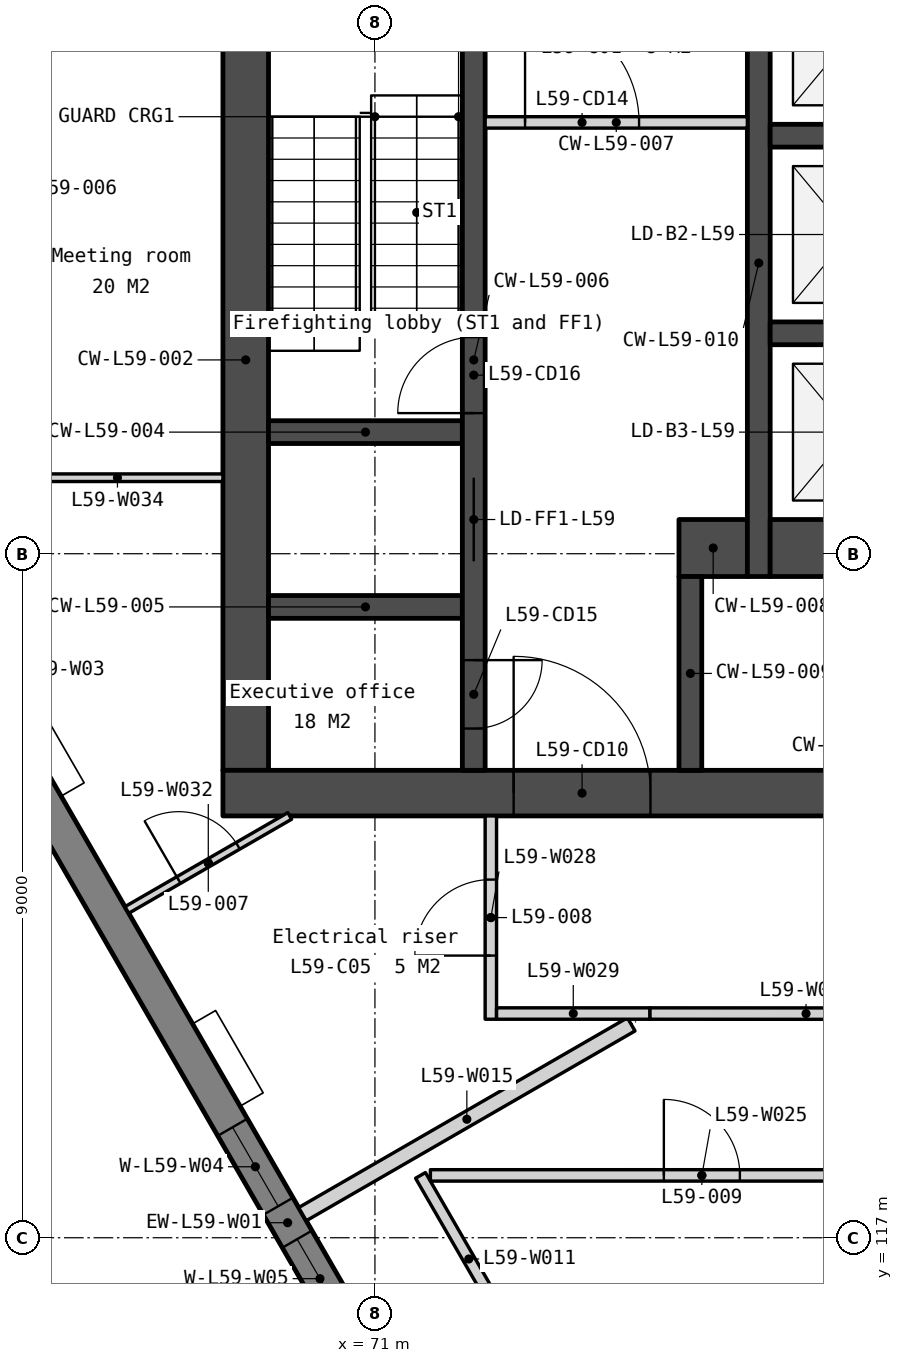
"""IFC4 building model, lengths in metres.
Left out: names, types, materials, properties, quantities, classifications, styles, units other than length and angle.
Written with IfcOpenShell. Run it as: python <this file> out.ifc"""

import sys

from ifc_helpers import new_model, si_unit, direction, frame, frame_2d, origin, place, context, subcontext, project, spatial, polyline, rectangle, outline, extrude, element, fill, save


model = new_model("IFC4")
c1 = context("Model", 3, precision=1e-05, world=origin(), true_north=direction((0.0, 1.0)))
c2 = subcontext(c1, "Body", "Model", "MODEL_VIEW")
j1 = project(units=[si_unit("LENGTHUNIT", "METRE"), si_unit("PLANEANGLEUNIT", "RADIAN")], contexts=[c1])
p1 = place(None, origin())
s1 = spatial("IfcSite", under=j1, at=p1, CompositionType="ELEMENT")
p2 = place(p1, origin())
s2 = spatial("IfcBuilding", under=s1, at=p2, CompositionType="ELEMENT")
p3 = place(p2, frame((0.0, 0.0, 242.6)))
s3 = spatial("IfcBuildingStorey", under=s2, at=p3, CompositionType="ELEMENT", Elevation=242.6)
p4 = place(p3, frame((69.3, 133.95, 0.0), z_axis=(0.0, 0.0, 1.0), x_axis=(0.0, -1.0, 0.0)))
e1 = element("IfcWall", 1, at=p4, inside=s3, PredefinedType="SOLIDWALL", context=c2, shape_type="SweptSolid", body=[
    extrude(rectangle(XDim=10.8, YDim=0.6, at=frame_2d((5.4, 0.0))), origin(), (0.0, 0.0, 1.0), 3.75),
])
p5 = place(p3, frame((69.0, 122.85, 0.0), z_axis=(0.0, 0.0, 1.0), x_axis=(1.0, 0.0, 0.0)))
e2 = element("IfcWall", 2, at=p5, inside=s3, PredefinedType="SOLIDWALL", context=c2, shape_type="SweptSolid", body=[
    extrude(rectangle(XDim=22.0, YDim=0.6, at=frame_2d((11.0, 0.0))), origin(), (0.0, 0.0, 1.0), 3.75),
])
p6 = place(p5, frame((16.375, 0.0, 0.0)))
e3 = element("IfcOpeningElement", 3, at=p6, cuts=e2, PredefinedType="OPENING", context=c2, shape_type="SweptSolid", body=[
    extrude(rectangle(XDim=1.8, YDim=2.1, at=frame_2d((0.9, 1.05))), frame((0.0, 0.31, 0.0), z_axis=(0.0, -1.0, 0.0), x_axis=(1.0, 0.0, 0.0)), (0.0, 0.0, 1.0), 0.62),
])
p7 = place(p5, frame((3.825, 0.0, 0.0)))
e4 = element("IfcOpeningElement", 4, at=p7, cuts=e2, PredefinedType="OPENING", context=c2, shape_type="SweptSolid", body=[
    extrude(rectangle(XDim=1.8, YDim=2.1, at=frame_2d((0.9, 1.05))), frame((0.0, 0.31, 0.0), z_axis=(0.0, -1.0, 0.0), x_axis=(1.0, 0.0, 0.0)), (0.0, 0.0, 1.0), 0.62),
])
p8 = place(p5, frame((12.85, 0.0, 0.0)))
e5 = element("IfcOpeningElement", 5, at=p8, cuts=e2, PredefinedType="OPENING", context=c2, shape_type="SweptSolid", body=[
    extrude(rectangle(XDim=1.5, YDim=2.1, at=frame_2d((0.75, 1.05))), frame((0.0, 0.31, 0.0), z_axis=(0.0, -1.0, 0.0), x_axis=(1.0, 0.0, 0.0)), (0.0, 0.0, 1.0), 0.62),
])
for number, where, z_axis, x_axis in (
    (6, (69.6, 127.6, 0.0), (0.0, 0.0, 1.0), (1.0, 0.0, 0.0)),
    (7, (69.6, 125.3, 0.0), (0.0, 0.0, 1.0), (1.0, 0.0, 0.0)),
):
    element("IfcWall", number, at=place(p3, frame(where, z_axis=z_axis, x_axis=x_axis)), inside=s3, PredefinedType="SOLIDWALL", context=c2, shape_type="SweptSolid", body=[
        extrude(rectangle(XDim=2.55, YDim=0.3, at=frame_2d((1.275, 0.0))), origin(), (0.0, 0.0, 1.0), 3.75),
    ])
p9 = place(p3, frame((72.3, 133.95, 0.0), z_axis=(0.0, 0.0, 1.0), x_axis=(0.0, -1.0, 0.0)))
e8 = element("IfcWall", 8, at=p9, inside=s3, PredefinedType="SOLIDWALL", context=c2, shape_type="SweptSolid", body=[
    extrude(rectangle(XDim=10.8, YDim=0.3, at=frame_2d((5.4, 0.0))), origin(), (0.0, 0.0, 1.0), 3.75),
])
p10 = place(p9, frame((6.95, 0.0, 0.0)))
e9 = element("IfcOpeningElement", 9, at=p10, cuts=e8, PredefinedType="OPENING", context=c2, shape_type="SweptSolid", body=[
    extrude(rectangle(XDim=1.1, YDim=2.1, at=frame_2d((0.55, 1.05))), frame((0.0, 0.16, 0.0), z_axis=(0.0, -1.0, 0.0), x_axis=(1.0, 0.0, 0.0)), (0.0, 0.0, 1.0), 0.32),
])
p11 = place(p9, frame((9.35, 0.0, 0.0)))
e10 = element("IfcOpeningElement", 10, at=p11, cuts=e8, PredefinedType="OPENING", context=c2, shape_type="SweptSolid", body=[
    extrude(rectangle(XDim=0.9, YDim=2.1, at=frame_2d((0.45, 1.05))), frame((0.0, 0.16, 0.0), z_axis=(0.0, -1.0, 0.0), x_axis=(1.0, 0.0, 0.0)), (0.0, 0.0, 1.0), 0.32),
])
p12 = place(p9, frame((5.1, 0.0, 0.0)))
e11 = element("IfcOpeningElement", 11, at=p12, cuts=e8, PredefinedType="OPENING", context=c2, shape_type="SweptSolid", body=[
    extrude(rectangle(XDim=1.0, YDim=2.1, at=frame_2d((0.5, 1.05))), frame((0.0, 0.16, 0.0), z_axis=(0.0, -1.0, 0.0), x_axis=(1.0, 0.0, 0.0)), (0.0, 0.0, 1.0), 0.32),
])
p13 = place(p3, frame((72.45, 131.675, 0.0), z_axis=(0.0, 0.0, 1.0), x_axis=(1.0, 0.0, 0.0)))
e12 = element("IfcWall", 12, at=p13, inside=s3, PredefinedType="PARTITIONING", context=c2, shape_type="SweptSolid", body=[
    extrude(rectangle(XDim=3.45, YDim=0.15, at=frame_2d((1.725, 0.0))), origin(), (0.0, 0.0, 1.0), 3.75),
])
p14 = place(p13, frame((0.525, 0.0, 0.0)))
e13 = element("IfcOpeningElement", 13, at=p14, cuts=e12, PredefinedType="OPENING", context=c2, shape_type="SweptSolid", body=[
    extrude(rectangle(XDim=1.5, YDim=2.1, at=frame_2d((0.75, 1.05))), frame((0.0, 0.085, 0.0), z_axis=(0.0, -1.0, 0.0), x_axis=(1.0, 0.0, 0.0)), (0.0, 0.0, 1.0), 0.17),
])
p15 = place(p3, frame((75.0, 126.075, 0.0), z_axis=(0.0, 0.0, 1.0), x_axis=(1.0, 0.0, 0.0)))
e14 = element("IfcWall", 14, at=p15, inside=s3, PredefinedType="SOLIDWALL", context=c2, shape_type="SweptSolid", body=[
    extrude(rectangle(XDim=0.9, YDim=0.75, at=frame_2d((0.45, 0.0))), origin(), (0.0, 0.0, 1.0), 3.75),
])
p16 = place(p3, frame((75.15, 125.7, 0.0), z_axis=(0.0, 0.0, 1.0), x_axis=(0.0, -1.0, 0.0)))
e15 = element("IfcWall", 15, at=p16, inside=s3, PredefinedType="SOLIDWALL", context=c2, shape_type="SweptSolid", body=[
    extrude(rectangle(XDim=2.55, YDim=0.3, at=frame_2d((1.275, 0.0))), origin(), (0.0, 0.0, 1.0), 3.75),
])
p17 = place(p3, frame((76.05, 133.95, 0.0), z_axis=(0.0, 0.0, 1.0), x_axis=(0.0, -1.0, 0.0)))
e16 = element("IfcWall", 16, at=p17, inside=s3, PredefinedType="SOLIDWALL", context=c2, shape_type="SweptSolid", body=[
    extrude(rectangle(XDim=8.25, YDim=0.3, at=frame_2d((4.125, 0.0))), origin(), (0.0, 0.0, 1.0), 3.75),
])
for number, where, z_axis, x_axis in (
    (17, (76.2, 131.5, 0.0), (0.0, 0.0, 1.0), (1.0, 0.0, 0.0)),
    (18, (76.2, 128.9, 0.0), (0.0, 0.0, 1.0), (1.0, 0.0, 0.0)),
):
    element("IfcWall", number, at=place(p3, frame(where, z_axis=z_axis, x_axis=x_axis)), inside=s3, PredefinedType="SOLIDWALL", context=c2, shape_type="SweptSolid", body=[
        extrude(rectangle(XDim=2.1, YDim=0.3, at=frame_2d((1.05, 0.0))), origin(), (0.0, 0.0, 1.0), 3.75),
    ])
p18 = place(p3, frame((76.2, 126.075, 0.0), z_axis=(0.0, 0.0, 1.0), x_axis=(1.0, 0.0, 0.0)))
e19 = element("IfcWall", 19, at=p18, inside=s3, PredefinedType="SOLIDWALL", context=c2, shape_type="SweptSolid", body=[
    extrude(rectangle(XDim=2.1, YDim=0.75, at=frame_2d((1.05, 0.0))), origin(), (0.0, 0.0, 1.0), 3.75),
])
p19 = place(p3, frame((60.609, 133.207, -0.15), z_axis=(0.0, 0.0, 1.0), x_axis=(0.500002536638, -0.866023939251, 0.0)))
e20 = element("IfcWall", 20, at=p19, inside=s3, PredefinedType="SOLIDWALL", context=c2, shape_type="SweptSolid", body=[
    extrude(outline(polyline([(36.972, 0.0), (36.972, 3.9), (0.0, 3.9), (0.0, 0.0), (36.972, 0.0)])), frame((0.0, 0.225, 0.0), z_axis=(0.0, -1.0, 0.0), x_axis=(1.0, 0.0, 0.0)), (0.0, 0.0, 1.0), 0.45),
])
p20 = place(p19, frame((0.715, 0.0, 0.95)))
e21 = element("IfcOpeningElement", 21, at=p20, cuts=e20, PredefinedType="OPENING", context=c2, shape_type="SweptSolid", body=[
    extrude(rectangle(XDim=1.2, YDim=2.2, at=frame_2d((0.6, 1.1))), frame((0.0, 0.235, 0.0), z_axis=(0.0, -1.0, 0.0), x_axis=(1.0, 0.0, 0.0)), (0.0, 0.0, 1.0), 0.47),
])
p21 = place(p19, frame((7.793, 0.0, 0.95)))
e22 = element("IfcOpeningElement", 22, at=p21, cuts=e20, PredefinedType="OPENING", context=c2, shape_type="SweptSolid", body=[
    extrude(rectangle(XDim=1.2, YDim=2.2, at=frame_2d((0.6, 1.1))), frame((0.0, 0.235, 0.0), z_axis=(0.0, -1.0, 0.0), x_axis=(1.0, 0.0, 0.0)), (0.0, 0.0, 1.0), 0.47),
])
p22 = place(p19, frame((9.493, 0.0, 0.95)))
e23 = element("IfcOpeningElement", 23, at=p22, cuts=e20, PredefinedType="OPENING", context=c2, shape_type="SweptSolid", body=[
    extrude(rectangle(XDim=1.2, YDim=2.2, at=frame_2d((0.6, 1.1))), frame((0.0, 0.235, 0.0), z_axis=(0.0, -1.0, 0.0), x_axis=(1.0, 0.0, 0.0)), (0.0, 0.0, 1.0), 0.47),
])
p23 = place(p19, frame((17.036, 0.0, 0.95)))
e24 = element("IfcOpeningElement", 24, at=p23, cuts=e20, PredefinedType="OPENING", context=c2, shape_type="SweptSolid", body=[
    extrude(rectangle(XDim=1.2, YDim=2.2, at=frame_2d((0.6, 1.1))), frame((0.0, 0.235, 0.0), z_axis=(0.0, -1.0, 0.0), x_axis=(1.0, 0.0, 0.0)), (0.0, 0.0, 1.0), 0.47),
])
p24 = place(p19, frame((18.736, 0.0, 0.95)))
e25 = element("IfcOpeningElement", 25, at=p24, cuts=e20, PredefinedType="OPENING", context=c2, shape_type="SweptSolid", body=[
    extrude(rectangle(XDim=1.2, YDim=2.2, at=frame_2d((0.6, 1.1))), frame((0.0, 0.235, 0.0), z_axis=(0.0, -1.0, 0.0), x_axis=(1.0, 0.0, 0.0)), (0.0, 0.0, 1.0), 0.47),
])
p25 = place(p19, frame((26.279, 0.0, 0.95)))
e26 = element("IfcOpeningElement", 26, at=p25, cuts=e20, PredefinedType="OPENING", context=c2, shape_type="SweptSolid", body=[
    extrude(rectangle(XDim=1.2, YDim=2.2, at=frame_2d((0.6, 1.1))), frame((0.0, 0.235, 0.0), z_axis=(0.0, -1.0, 0.0), x_axis=(1.0, 0.0, 0.0)), (0.0, 0.0, 1.0), 0.47),
])
p26 = place(p19, frame((27.979, 0.0, 0.95)))
e27 = element("IfcOpeningElement", 27, at=p26, cuts=e20, PredefinedType="OPENING", context=c2, shape_type="SweptSolid", body=[
    extrude(rectangle(XDim=1.2, YDim=2.2, at=frame_2d((0.6, 1.1))), frame((0.0, 0.235, 0.0), z_axis=(0.0, -1.0, 0.0), x_axis=(1.0, 0.0, 0.0)), (0.0, 0.0, 1.0), 0.47),
])
p27 = place(p19, frame((35.058, 0.0, 0.95)))
e28 = element("IfcOpeningElement", 28, at=p27, cuts=e20, PredefinedType="OPENING", context=c2, shape_type="SweptSolid", body=[
    extrude(rectangle(XDim=1.2, YDim=2.2, at=frame_2d((0.6, 1.1))), frame((0.0, 0.235, 0.0), z_axis=(0.0, -1.0, 0.0), x_axis=(1.0, 0.0, 0.0)), (0.0, 0.0, 1.0), 0.47),
])
p28 = place(p3, frame((71.6, 117.82, 0.0), z_axis=(0.0, 0.0, 1.0), x_axis=(0.500035802948, -0.866004731956, 0.0)))
e29 = element("IfcWall", 29, at=p28, inside=s3, PredefinedType="PARTITIONING", context=c2, shape_type="SweptSolid", body=[
    extrude(rectangle(XDim=2.54, YDim=0.15, at=frame_2d((1.27, 0.0))), origin(), (0.0, 0.0, 1.0), 3.75),
])
p29 = place(p3, frame((70.047, 117.31, 0.0), z_axis=(0.0, 0.0, 1.0), x_axis=(0.866032544947, 0.499987630939, 0.0)))
e30 = element("IfcWall", 30, at=p29, inside=s3, PredefinedType="PARTITIONING", context=c2, shape_type="SweptSolid", body=[
    extrude(rectangle(XDim=4.994, YDim=0.2, at=frame_2d((2.497, 0.0))), origin(), (0.0, 0.0, 1.0), 3.75),
])
p30 = place(p3, frame((71.729, 117.82, 0.0), z_axis=(0.0, 0.0, 1.0), x_axis=(1.0, 0.0, 0.0)))
e31 = element("IfcWall", 31, at=p30, inside=s3, PredefinedType="PARTITIONING", context=c2, shape_type="SweptSolid", body=[
    extrude(rectangle(XDim=7.144, YDim=0.15, at=frame_2d((3.572, 0.0))), origin(), (0.0, 0.0, 1.0), 3.75),
])
p31 = place(p30, frame((3.072, 0.0, 0.0)))
e32 = element("IfcOpeningElement", 32, at=p31, cuts=e31, PredefinedType="OPENING", context=c2, shape_type="SweptSolid", body=[
    extrude(rectangle(XDim=1.0, YDim=2.1, at=frame_2d((0.5, 1.05))), frame((0.0, 0.085, 0.0), z_axis=(0.0, -1.0, 0.0), x_axis=(1.0, 0.0, 0.0)), (0.0, 0.0, 1.0), 0.17),
])
p32 = place(p3, frame((72.525, 119.875, 0.0), z_axis=(0.0, 0.0, 1.0), x_axis=(0.0, 1.0, 0.0)))
e33 = element("IfcWall", 33, at=p32, inside=s3, PredefinedType="PARTITIONING", context=c2, shape_type="SweptSolid", body=[
    extrude(rectangle(XDim=2.675, YDim=0.15, at=frame_2d((1.337, 0.0))), origin(), (0.0, 0.0, 1.0), 3.75),
])
p33 = place(p32, frame((0.837, 0.0, 0.0)))
e34 = element("IfcOpeningElement", 34, at=p33, cuts=e33, PredefinedType="OPENING", context=c2, shape_type="SweptSolid", body=[
    extrude(rectangle(XDim=1.0, YDim=2.1, at=frame_2d((0.5, 1.05))), frame((0.0, 0.085, 0.0), z_axis=(0.0, -1.0, 0.0), x_axis=(1.0, 0.0, 0.0)), (0.0, 0.0, 1.0), 0.17),
])
p34 = place(p3, frame((72.6, 119.95, 0.0), z_axis=(0.0, 0.0, 1.0), x_axis=(1.0, 0.0, 0.0)))
e35 = element("IfcWall", 35, at=p34, inside=s3, PredefinedType="PARTITIONING", context=c2, shape_type="SweptSolid", body=[
    extrude(rectangle(XDim=2.019, YDim=0.15, at=frame_2d((1.009, 0.0))), origin(), (0.0, 0.0, 1.0), 3.75),
])
p35 = place(p3, frame((74.619, 119.95, 0.0), z_axis=(0.0, 0.0, 1.0), x_axis=(0.999999886891, -0.000475624203, 0.0)))
e36 = element("IfcWall", 36, at=p35, inside=s3, PredefinedType="PARTITIONING", context=c2, shape_type="SweptSolid", body=[
    extrude(rectangle(XDim=4.106, YDim=0.15, at=frame_2d((2.053, 0.0))), origin(), (0.0, 0.0, 1.0), 3.75),
])
p36 = place(p3, frame((67.736, 121.313, 0.0), z_axis=(0.0, 0.0, 1.0), x_axis=(0.866024577697, 0.500001430823, 0.0)))
e37 = element("IfcWall", 37, at=p36, inside=s3, PredefinedType="PARTITIONING", context=c2, shape_type="SweptSolid", body=[
    extrude(rectangle(XDim=2.475, YDim=0.1, at=frame_2d((1.237, 0.0))), origin(), (0.0, 0.0, 1.0), 3.75),
])
p37 = place(p36, frame((0.787, 0.0, 0.0)))
e38 = element("IfcOpeningElement", 38, at=p37, cuts=e37, PredefinedType="OPENING", context=c2, shape_type="SweptSolid", body=[
    extrude(rectangle(XDim=0.9, YDim=2.1, at=frame_2d((0.45, 1.05))), frame((0.0, 0.06, 0.0), z_axis=(0.0, -1.0, 0.0), x_axis=(1.0, 0.0, 0.0)), (0.0, 0.0, 1.0), 0.12),
])
p38 = place(p3, frame((66.224, 127.0, 0.0), z_axis=(0.0, 0.0, 1.0), x_axis=(1.0, 0.0, 0.0)))
e39 = element("IfcWall", 39, at=p38, inside=s3, PredefinedType="PARTITIONING", context=c2, shape_type="SweptSolid", body=[
    extrude(rectangle(XDim=2.776, YDim=0.1, at=frame_2d((1.388, 0.0))), origin(), (0.0, 0.0, 1.0), 3.75),
])
p39 = place(p10, origin())
e40 = element("IfcDoor", 40, at=p39, inside=s3, OperationType="SLIDING_TO_LEFT", PredefinedType="DOOR", context=c2, shape_type="SweptSolid", body=[
    extrude(rectangle(XDim=1.1, YDim=2.1, at=frame_2d((0.55, 1.05))), frame((0.0, 0.025, 0.0), z_axis=(0.0, -1.0, 0.0), x_axis=(1.0, 0.0, 0.0)), (0.0, 0.0, 1.0), 0.05),
])
fill(e9, e40)
p40 = place(p7, origin())
e41 = element("IfcDoor", 41, at=p40, inside=s3, OperationType="DOUBLE_DOOR_DOUBLE_SWING", PredefinedType="DOOR", context=c2, shape_type="SweptSolid", body=[
    extrude(rectangle(XDim=1.8, YDim=2.1, at=frame_2d((0.9, 1.05))), frame((0.0, 0.025, 0.0), z_axis=(0.0, -1.0, 0.0), x_axis=(1.0, 0.0, 0.0)), (0.0, 0.0, 1.0), 0.05),
])
fill(e4, e41)
p41 = place(p14, origin())
e42 = element("IfcDoor", 42, at=p41, inside=s3, OperationType="DOUBLE_DOOR_DOUBLE_SWING", PredefinedType="DOOR", context=c2, shape_type="SweptSolid", body=[
    extrude(rectangle(XDim=1.5, YDim=2.1, at=frame_2d((0.75, 1.05))), frame((0.0, 0.025, 0.0), z_axis=(0.0, -1.0, 0.0), x_axis=(1.0, 0.0, 0.0)), (0.0, 0.0, 1.0), 0.05),
])
fill(e13, e42)
p42 = place(p11, origin())
e43 = element("IfcDoor", 43, at=p42, inside=s3, OperationType="SINGLE_SWING_LEFT", PredefinedType="DOOR", context=c2, shape_type="SweptSolid", body=[
    extrude(rectangle(XDim=0.9, YDim=2.1, at=frame_2d((0.45, 1.05))), frame((0.0, 0.025, 0.0), z_axis=(0.0, -1.0, 0.0), x_axis=(1.0, 0.0, 0.0)), (0.0, 0.0, 1.0), 0.05),
])
fill(e10, e43)
p43 = place(p12, origin())
e44 = element("IfcDoor", 44, at=p43, inside=s3, OperationType="SINGLE_SWING_RIGHT", PredefinedType="DOOR", context=c2, shape_type="SweptSolid", body=[
    extrude(rectangle(XDim=1.0, YDim=2.1, at=frame_2d((0.5, 1.05))), frame((0.0, 0.025, 0.0), z_axis=(0.0, -1.0, 0.0), x_axis=(1.0, 0.0, 0.0)), (0.0, 0.0, 1.0), 0.05),
])
fill(e11, e44)
p44 = place(p23, origin())
e45 = element("IfcWindow", 45, at=p44, inside=s3, PartitioningType="SINGLE_PANEL", PredefinedType="WINDOW", context=c2, shape_type="SweptSolid", body=[
    extrude(rectangle(XDim=1.2, YDim=2.2, at=frame_2d((0.6, 1.1))), frame((0.0, 0.03, 0.0), z_axis=(0.0, -1.0, 0.0), x_axis=(1.0, 0.0, 0.0)), (0.0, 0.0, 1.0), 0.06),
])
fill(e24, e45)
p45 = place(p24, origin())
e46 = element("IfcWindow", 46, at=p45, inside=s3, PartitioningType="SINGLE_PANEL", PredefinedType="WINDOW", context=c2, shape_type="SweptSolid", body=[
    extrude(rectangle(XDim=1.2, YDim=2.2, at=frame_2d((0.6, 1.1))), frame((0.0, 0.03, 0.0), z_axis=(0.0, -1.0, 0.0), x_axis=(1.0, 0.0, 0.0)), (0.0, 0.0, 1.0), 0.06),
])
fill(e25, e46)
p46 = place(p37, origin())
e47 = element("IfcDoor", 47, at=p46, inside=s3, OperationType="SINGLE_SWING_LEFT", PredefinedType="DOOR", context=c2, shape_type="SweptSolid", body=[
    extrude(rectangle(XDim=0.9, YDim=2.1, at=frame_2d((0.45, 1.05))), frame((0.0, 0.025, 0.0), z_axis=(0.0, -1.0, 0.0), x_axis=(1.0, 0.0, 0.0)), (0.0, 0.0, 1.0), 0.05),
])
fill(e38, e47)
p47 = place(p33, origin())
e48 = element("IfcDoor", 48, at=p47, inside=s3, OperationType="SINGLE_SWING_LEFT", PredefinedType="DOOR", context=c2, shape_type="SweptSolid", body=[
    extrude(rectangle(XDim=1.0, YDim=2.1, at=frame_2d((0.5, 1.05))), frame((0.0, 0.025, 0.0), z_axis=(0.0, -1.0, 0.0), x_axis=(1.0, 0.0, 0.0)), (0.0, 0.0, 1.0), 0.05),
])
fill(e34, e48)
p48 = place(p31, origin())
e49 = element("IfcDoor", 49, at=p48, inside=s3, OperationType="SINGLE_SWING_LEFT", PredefinedType="DOOR", context=c2, shape_type="SweptSolid", body=[
    extrude(rectangle(XDim=1.0, YDim=2.1, at=frame_2d((0.5, 1.05))), frame((0.0, 0.025, 0.0), z_axis=(0.0, -1.0, 0.0), x_axis=(1.0, 0.0, 0.0)), (0.0, 0.0, 1.0), 0.05),
])
fill(e32, e49)
save(model, sys.argv[1])
